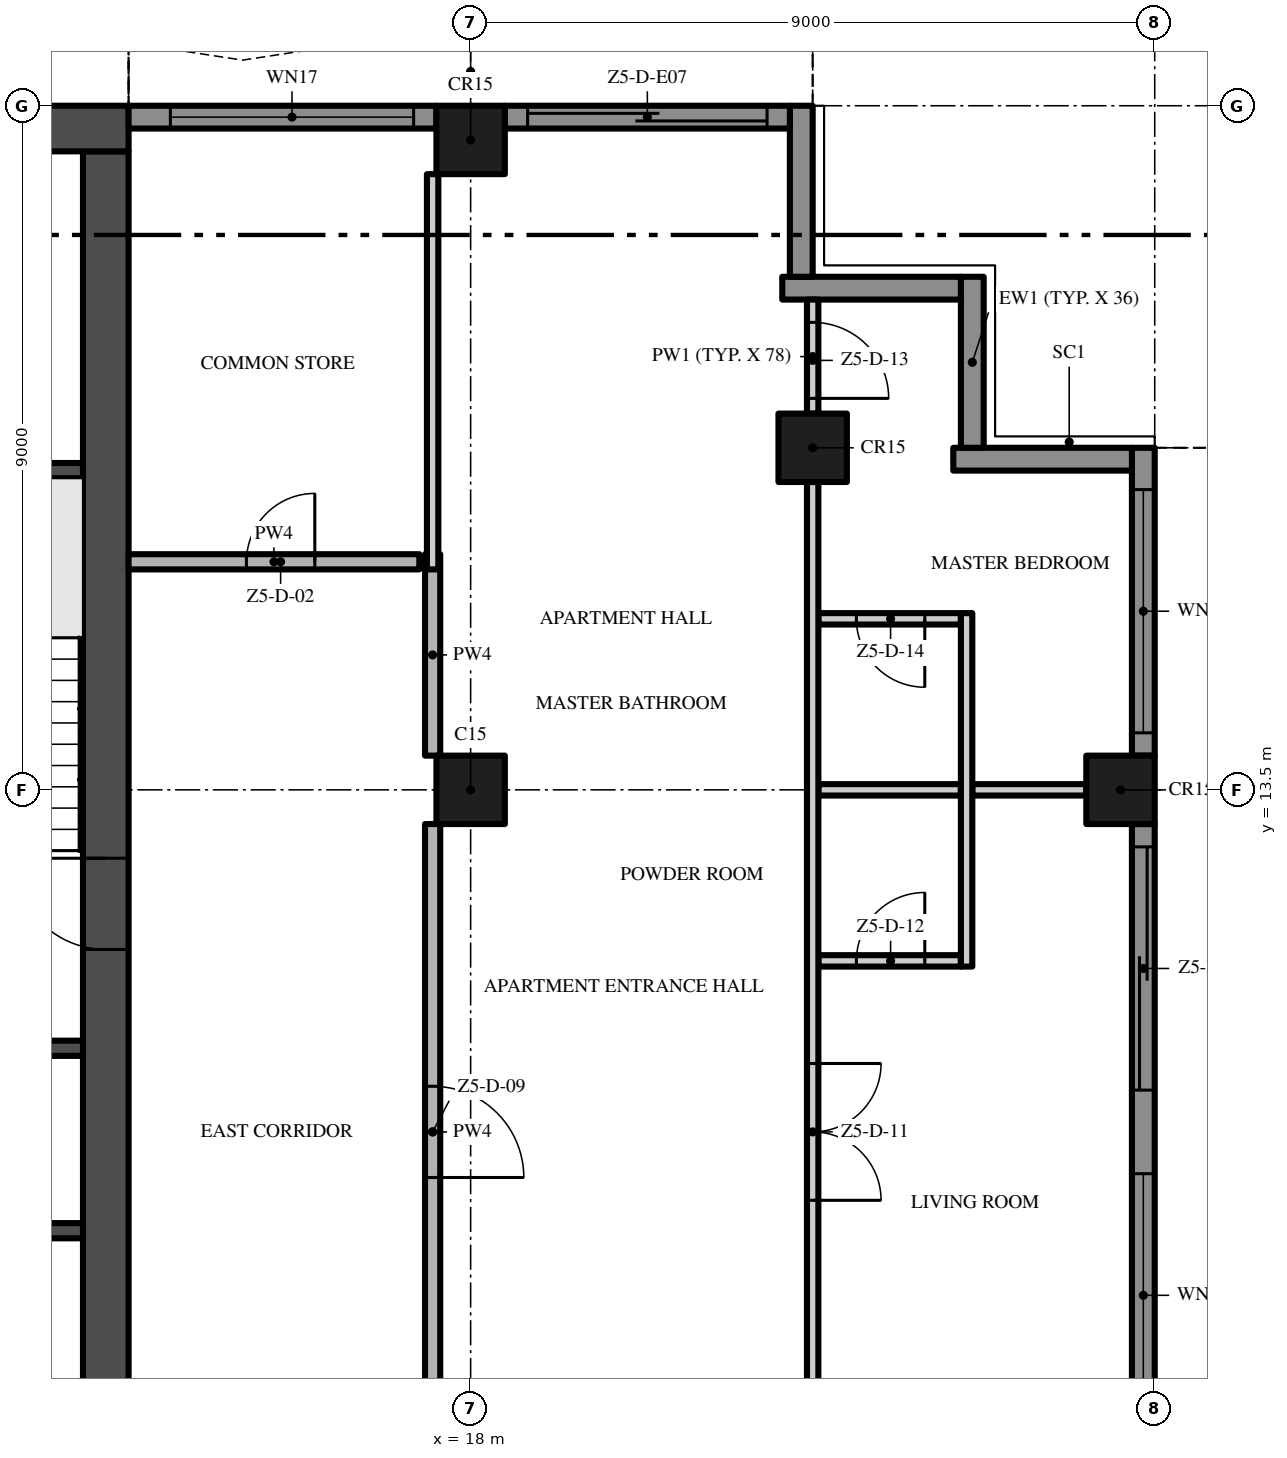
"""IFC4 building model, lengths in metres.
Left out: names, types, materials, properties, quantities, classifications, styles, units other than length and angle.
Written with IfcOpenShell. Run it as: python <this file> out.ifc"""

import sys

from ifc_helpers import new_model, si_unit, direction, frame, frame_2d, origin, origin_2d, place, context, subcontext, project, spatial, polyline, rectangle, outline, extrude, element, fill, save


model = new_model("IFC4")
c1 = context("Model", 3, precision=1e-05, world=origin(), true_north=direction((0.0, 1.0)))
c2 = subcontext(c1, "Body", "Model", "MODEL_VIEW")
j1 = project(units=[si_unit("LENGTHUNIT", "METRE"), si_unit("PLANEANGLEUNIT", "RADIAN")], contexts=[c1])
p1 = place(None, origin())
s1 = spatial("IfcSite", under=j1, at=p1, CompositionType="ELEMENT")
p2 = place(p1, origin())
s2 = spatial("IfcBuilding", under=s1, at=p2, CompositionType="ELEMENT")
p3 = place(p2, frame((0.0, 0.0, 280.6)))
s3 = spatial("IfcBuildingStorey", under=s2, at=p3, CompositionType="ELEMENT", Elevation=280.6)
p4 = place(p3, frame((13.2, 5.1, -0.3), z_axis=(0.0, 0.0, 1.0), x_axis=(0.0, 1.0, 0.0)))
e1 = element("IfcWall", 1, at=p4, inside=s3, PredefinedType="SHEAR", context=c2, shape_type="SweptSolid", body=[
    extrude(rectangle(XDim=16.8, YDim=0.6, at=frame_2d((8.4, 0.0))), origin(), (0.0, 0.0, 1.0), 3.8),
])
p5 = place(p4, frame((6.3, 0.0, 0.3)))
e2 = element("IfcOpeningElement", 2, at=p5, cuts=e1, PredefinedType="OPENING", context=c2, shape_type="SweptSolid", body=[
    extrude(rectangle(XDim=1.2, YDim=2.2, at=frame_2d((0.6, 1.1))), frame((0.0, 0.31, 0.0), z_axis=(0.0, -1.0, 0.0), x_axis=(1.0, 0.0, 0.0)), (0.0, 0.0, 1.0), 0.62),
])
p6 = place(p3, frame((13.5, 22.2, -0.3), z_axis=(0.0, 0.0, 1.0), x_axis=(-1.0, 0.0, 0.0)))
e3 = element("IfcWall", 3, at=p6, inside=s3, PredefinedType="SHEAR", context=c2, shape_type="SweptSolid", body=[
    extrude(rectangle(XDim=27.0, YDim=0.6, at=frame_2d((13.5, 0.0))), origin(), (0.0, 0.0, 1.0), 3.8),
])
for number, where, z_axis, x_axis in (
    (4, (18.0, 13.5, 0.0), (0.0, 0.0, 1.0), (1.0, 0.0, 0.0)),
    (5, (18.0, 22.05, 0.0), (0.0, 0.0, 1.0), (1.0, 0.0, 0.0)),
    (6, (26.55, 13.5, 0.0), (0.0, 0.0, 1.0), (1.0, 0.0, 0.0)),
    (7, (22.5, 18.0, 0.0), (0.0, 0.0, 1.0), (1.0, 0.0, 0.0)),
):
    element("IfcColumn", number, at=place(p3, frame(where, z_axis=z_axis, x_axis=x_axis)), inside=s3, PredefinedType="COLUMN", context=c2, shape_type="SweptSolid", body=[
        extrude(rectangle(XDim=0.9, YDim=0.9, at=origin_2d()), origin(), (0.0, 0.0, 1.0), 3.5),
    ])
p7 = place(p3, frame((26.85, 13.05, 0.0), z_axis=(0.0, 0.0, 1.0), x_axis=(0.0, -1.0, 0.0)))
e8 = element("IfcWall", 8, at=p7, inside=s3, PredefinedType="SOLIDWALL", context=c2, shape_type="SweptSolid", body=[
    extrude(rectangle(XDim=8.1, YDim=0.3, at=frame_2d((4.05, 0.0))), origin(), (0.0, 0.0, 1.0), 3.5),
])
p8 = place(p7, frame((4.6, 0.0, 0.45)))
e9 = element("IfcOpeningElement", 9, at=p8, cuts=e8, PredefinedType="OPENING", context=c2, shape_type="SweptSolid", body=[
    extrude(rectangle(XDim=3.2, YDim=2.65, at=frame_2d((1.6, 1.325))), frame((0.0, 0.16, 0.0), z_axis=(0.0, -1.0, 0.0), x_axis=(1.0, 0.0, 0.0)), (0.0, 0.0, 1.0), 0.32),
])
p9 = place(p7, frame((0.3, 0.0, 0.0)))
e10 = element("IfcOpeningElement", 10, at=p9, cuts=e8, PredefinedType="OPENING", context=c2, shape_type="SweptSolid", body=[
    extrude(rectangle(XDim=3.2, YDim=2.4, at=frame_2d((1.6, 1.2))), frame((0.0, 0.16, 0.0), z_axis=(0.0, -1.0, 0.0), x_axis=(1.0, 0.0, 0.0)), (0.0, 0.0, 1.0), 0.32),
])
p10 = place(p3, frame((26.85, 18.0, 0.0), z_axis=(0.0, 0.0, 1.0), x_axis=(0.0, -1.0, 0.0)))
e11 = element("IfcWall", 11, at=p10, inside=s3, PredefinedType="SOLIDWALL", context=c2, shape_type="SweptSolid", body=[
    extrude(rectangle(XDim=4.05, YDim=0.3, at=frame_2d((2.025, 0.0))), origin(), (0.0, 0.0, 1.0), 3.5),
])
p11 = place(p10, frame((0.55, 0.0, 0.45)))
e12 = element("IfcOpeningElement", 12, at=p11, cuts=e11, PredefinedType="OPENING", context=c2, shape_type="SweptSolid", body=[
    extrude(rectangle(XDim=3.2, YDim=2.65, at=frame_2d((1.6, 1.325))), frame((0.0, 0.16, 0.0), z_axis=(0.0, -1.0, 0.0), x_axis=(1.0, 0.0, 0.0)), (0.0, 0.0, 1.0), 0.32),
])
p12 = place(p3, frame((24.35, 17.85, 0.0), z_axis=(0.0, 0.0, 1.0), x_axis=(1.0, 0.0, 0.0)))
e13 = element("IfcWall", 13, at=p12, inside=s3, PredefinedType="SOLIDWALL", context=c2, shape_type="SweptSolid", body=[
    extrude(rectangle(XDim=2.35, YDim=0.3, at=frame_2d((1.175, 0.0))), origin(), (0.0, 0.0, 1.0), 3.5),
])
p13 = place(p3, frame((24.6, 20.25, 0.0), z_axis=(0.0, 0.0, 1.0), x_axis=(0.0, -1.0, 0.0)))
e14 = element("IfcWall", 14, at=p13, inside=s3, PredefinedType="SOLIDWALL", context=c2, shape_type="SweptSolid", body=[
    extrude(rectangle(XDim=2.25, YDim=0.3, at=frame_2d((1.125, 0.0))), origin(), (0.0, 0.0, 1.0), 3.5),
])
p14 = place(p3, frame((22.1, 20.1, 0.0), z_axis=(0.0, 0.0, 1.0), x_axis=(1.0, 0.0, 0.0)))
e15 = element("IfcWall", 15, at=p14, inside=s3, PredefinedType="SOLIDWALL", context=c2, shape_type="SweptSolid", body=[
    extrude(rectangle(XDim=2.35, YDim=0.3, at=frame_2d((1.175, 0.0))), origin(), (0.0, 0.0, 1.0), 3.5),
])
p15 = place(p3, frame((22.35, 22.5, 0.0), z_axis=(0.0, 0.0, 1.0), x_axis=(0.0, -1.0, 0.0)))
e16 = element("IfcWall", 16, at=p15, inside=s3, PredefinedType="SOLIDWALL", context=c2, shape_type="SweptSolid", body=[
    extrude(rectangle(XDim=2.25, YDim=0.3, at=frame_2d((1.125, 0.0))), origin(), (0.0, 0.0, 1.0), 3.5),
])
p16 = place(p3, frame((18.45, 22.35, 0.0), z_axis=(0.0, 0.0, 1.0), x_axis=(1.0, 0.0, 0.0)))
e17 = element("IfcWall", 17, at=p16, inside=s3, PredefinedType="SOLIDWALL", context=c2, shape_type="SweptSolid", body=[
    extrude(rectangle(XDim=3.75, YDim=0.3, at=frame_2d((1.875, 0.0))), origin(), (0.0, 0.0, 1.0), 3.5),
])
p17 = place(p16, frame((0.3, 0.0, 0.0)))
e18 = element("IfcOpeningElement", 18, at=p17, cuts=e17, PredefinedType="OPENING", context=c2, shape_type="SweptSolid", body=[
    extrude(rectangle(XDim=3.15, YDim=2.4, at=frame_2d((1.575, 1.2))), frame((0.0, 0.16, 0.0), z_axis=(0.0, -1.0, 0.0), x_axis=(1.0, 0.0, 0.0)), (0.0, 0.0, 1.0), 0.32),
])
p18 = place(p3, frame((13.5, 22.35, 0.0), z_axis=(0.0, 0.0, 1.0), x_axis=(1.0, 0.0, 0.0)))
e19 = element("IfcWall", 19, at=p18, inside=s3, PredefinedType="SOLIDWALL", context=c2, shape_type="SweptSolid", body=[
    extrude(rectangle(XDim=4.05, YDim=0.3, at=frame_2d((2.025, 0.0))), origin(), (0.0, 0.0, 1.0), 3.5),
])
p19 = place(p18, frame((0.55, 0.0, 0.45)))
e20 = element("IfcOpeningElement", 20, at=p19, cuts=e19, PredefinedType="OPENING", context=c2, shape_type="SweptSolid", body=[
    extrude(rectangle(XDim=3.2, YDim=2.65, at=frame_2d((1.6, 1.325))), frame((0.0, 0.16, 0.0), z_axis=(0.0, -1.0, 0.0), x_axis=(1.0, 0.0, 0.0)), (0.0, 0.0, 1.0), 0.32),
])
p20 = place(p3, origin())
e21 = element("IfcWall", 21, at=p20, inside=s3, PredefinedType="USERDEFINED", context=c2, shape_type="SweptSolid", body=[
    extrude(outline(polyline([(30.0, -18.0), (29.771, -16.5), (29.171, -15.0), (28.429, -13.5), (27.829, -12.0), (27.6, -10.5), (27.829, -9.0), (28.429, -7.5), (29.171, -6.0), (29.771, -4.5), (30.0, -3.0), (29.771, -1.5), (29.171, 0.0), (28.429, 1.5), (27.829, 3.0), (27.6, 4.5), (27.829, 6.0), (28.429, 7.5), (29.171, 9.0), (29.771, 10.5), (30.0, 12.0), (29.771, 13.5), (29.171, 15.0), (28.429, 16.5), (27.829, 18.0), (27.597, 17.907), (28.201, 16.398), (28.942, 14.898), (29.528, 13.434), (29.747, 12.0), (29.528, 10.566), (28.942, 9.102), (28.201, 7.602), (27.586, 6.066), (27.347, 4.5), (27.586, 2.934), (28.201, 1.398), (28.942, -0.102), (29.528, -1.566), (29.747, -3.0), (29.528, -4.434), (28.942, -5.898), (28.201, -7.398), (27.586, -8.934), (27.347, -10.5), (27.586, -12.066), (28.201, -13.602), (28.942, -15.102), (29.528, -16.566), (29.753, -18.038), (30.0, -18.0)])), origin(), (0.0, 0.0, 1.0), 0.9),
])
p21 = place(p3, origin())
e22 = element("IfcWall", 22, at=p21, inside=s3, PredefinedType="USERDEFINED", context=c2, shape_type="SweptSolid", body=[
    extrude(outline(polyline([(22.5, 25.5), (21.0, 25.271), (19.5, 24.671), (18.0, 23.929), (16.5, 23.329), (15.0, 23.1), (13.5, 23.329), (13.462, 23.082), (15.0, 22.847), (16.566, 23.086), (18.102, 23.701), (19.602, 24.442), (21.066, 25.028), (22.538, 25.253), (22.5, 25.5)])), origin(), (0.0, 0.0, 1.0), 0.9),
])
for number, where, z_axis, x_axis in (
    (23, (9.65, 7.7, 0.0), (0.0, 0.0, 1.0), (1.0, 0.0, 0.0)),
    (24, (9.65, 10.1, 0.0), (0.0, 0.0, 1.0), (1.0, 0.0, 0.0)),
    (25, (9.65, 17.7, 0.0), (0.0, 0.0, 1.0), (1.0, 0.0, 0.0)),
):
    element("IfcWall", number, at=place(p3, frame(where, z_axis=z_axis, x_axis=x_axis)), inside=s3, PredefinedType="SHEAR", context=c2, shape_type="SweptSolid", body=[
        extrude(rectangle(XDim=3.25, YDim=0.2, at=frame_2d((1.625, 0.0))), origin(), (0.0, 0.0, 1.0), 3.5),
    ])
p22 = place(p3, frame((22.575, 11.25, 0.0), z_axis=(0.0, 0.0, 1.0), x_axis=(1.0, 0.0, 0.0)))
e26 = element("IfcWall", 26, at=p22, inside=s3, PredefinedType="PARTITIONING", context=c2, shape_type="SweptSolid", body=[
    extrude(rectangle(XDim=1.875, YDim=0.15, at=frame_2d((0.938, 0.0))), origin(), (0.0, 0.0, 1.0), 3.5),
])
p23 = place(p22, frame((0.5, 0.0, 0.0)))
e27 = element("IfcOpeningElement", 27, at=p23, cuts=e26, PredefinedType="OPENING", context=c2, shape_type="SweptSolid", body=[
    extrude(rectangle(XDim=0.9, YDim=2.1, at=frame_2d((0.45, 1.05))), frame((0.0, 0.085, 0.0), z_axis=(0.0, -1.0, 0.0), x_axis=(1.0, 0.0, 0.0)), (0.0, 0.0, 1.0), 0.17),
])
p24 = place(p3, frame((22.575, 13.5, 0.0), z_axis=(0.0, 0.0, 1.0), x_axis=(1.0, 0.0, 0.0)))
e28 = element("IfcWall", 28, at=p24, inside=s3, PredefinedType="PARTITIONING", context=c2, shape_type="SweptSolid", body=[
    extrude(rectangle(XDim=1.875, YDim=0.15, at=frame_2d((0.938, 0.0))), origin(), (0.0, 0.0, 1.0), 3.5),
])
p25 = place(p3, frame((24.6, 13.5, 0.0), z_axis=(0.0, 0.0, 1.0), x_axis=(1.0, 0.0, 0.0)))
e29 = element("IfcWall", 29, at=p25, inside=s3, PredefinedType="PARTITIONING", context=c2, shape_type="SweptSolid", body=[
    extrude(rectangle(XDim=1.5, YDim=0.15, at=frame_2d((0.75, 0.0))), origin(), (0.0, 0.0, 1.0), 3.5),
])
p26 = place(p3, frame((24.45, 15.75, 0.0), z_axis=(0.0, 0.0, 1.0), x_axis=(-1.0, 0.0, 0.0)))
e30 = element("IfcWall", 30, at=p26, inside=s3, PredefinedType="PARTITIONING", context=c2, shape_type="SweptSolid", body=[
    extrude(rectangle(XDim=1.875, YDim=0.15, at=frame_2d((0.938, 0.0))), origin(), (0.0, 0.0, 1.0), 3.5),
])
p27 = place(p26, frame((0.475, 0.0, 0.0)))
e31 = element("IfcOpeningElement", 31, at=p27, cuts=e30, PredefinedType="OPENING", context=c2, shape_type="SweptSolid", body=[
    extrude(rectangle(XDim=0.9, YDim=2.1, at=frame_2d((0.45, 1.05))), frame((0.0, 0.085, 0.0), z_axis=(0.0, -1.0, 0.0), x_axis=(1.0, 0.0, 0.0)), (0.0, 0.0, 1.0), 0.17),
])
p28 = place(p3, frame((13.5, 16.5, 0.0), z_axis=(0.0, 0.0, 1.0), x_axis=(1.0, 0.0, 0.0)))
e32 = element("IfcWall", 32, at=p28, inside=s3, PredefinedType="PARTITIONING", context=c2, shape_type="SweptSolid", body=[
    extrude(rectangle(XDim=3.825, YDim=0.2, at=frame_2d((1.913, 0.0))), origin(), (0.0, 0.0, 1.0), 3.5),
])
p29 = place(p28, frame((1.55, 0.0, 0.0)))
e33 = element("IfcOpeningElement", 33, at=p29, cuts=e32, PredefinedType="OPENING", context=c2, shape_type="SweptSolid", body=[
    extrude(rectangle(XDim=0.9, YDim=2.1, at=frame_2d((0.45, 1.05))), frame((0.0, 0.11, 0.0), z_axis=(0.0, -1.0, 0.0), x_axis=(1.0, 0.0, 0.0)), (0.0, 0.0, 1.0), 0.22),
])
p30 = place(p3, frame((17.5, 13.05, 0.0), z_axis=(0.0, 0.0, 1.0), x_axis=(0.0, -1.0, 0.0)))
e34 = element("IfcWall", 34, at=p30, inside=s3, PredefinedType="PARTITIONING", context=c2, shape_type="SweptSolid", body=[
    extrude(rectangle(XDim=8.1, YDim=0.2, at=frame_2d((4.05, 0.0))), origin(), (0.0, 0.0, 1.0), 3.5),
])
p31 = place(p30, frame((3.45, 0.0, 0.0)))
e35 = element("IfcOpeningElement", 35, at=p31, cuts=e34, PredefinedType="OPENING", context=c2, shape_type="SweptSolid", body=[
    extrude(rectangle(XDim=1.2, YDim=2.4, at=frame_2d((0.6, 1.2))), frame((0.0, 0.11, 0.0), z_axis=(0.0, -1.0, 0.0), x_axis=(1.0, 0.0, 0.0)), (0.0, 0.0, 1.0), 0.22),
])
p32 = place(p3, frame((17.5, 13.95, 0.0), z_axis=(0.0, 0.0, 1.0), x_axis=(0.0, 1.0, 0.0)))
e36 = element("IfcWall", 36, at=p32, inside=s3, PredefinedType="PARTITIONING", context=c2, shape_type="SweptSolid", body=[
    extrude(rectangle(XDim=2.65, YDim=0.2, at=frame_2d((1.325, 0.0))), origin(), (0.0, 0.0, 1.0), 3.5),
])
p33 = place(p3, frame((17.5, 16.4, 0.0), z_axis=(0.0, 0.0, 1.0), x_axis=(0.0, 1.0, 0.0)))
e37 = element("IfcWall", 37, at=p33, inside=s3, PredefinedType="PARTITIONING", context=c2, shape_type="SweptSolid", body=[
    extrude(rectangle(XDim=5.2, YDim=0.15, at=frame_2d((2.6, 0.0))), origin(), (0.0, 0.0, 1.0), 3.5),
])
p34 = place(p3, frame((22.5, 17.55, 0.0), z_axis=(0.0, 0.0, 1.0), x_axis=(0.0, -1.0, 0.0)))
e38 = element("IfcWall", 38, at=p34, inside=s3, PredefinedType="PARTITIONING", context=c2, shape_type="SweptSolid", body=[
    extrude(rectangle(XDim=17.45, YDim=0.15, at=frame_2d((8.725, 0.0))), origin(), (0.0, 0.0, 1.0), 3.5),
])
p35 = place(p34, frame((14.8, 0.0, 0.0)))
e39 = element("IfcOpeningElement", 39, at=p35, cuts=e38, PredefinedType="OPENING", context=c2, shape_type="SweptSolid", body=[
    extrude(rectangle(XDim=1.0, YDim=2.4, at=frame_2d((0.5, 1.2))), frame((0.0, 0.085, 0.0), z_axis=(0.0, -1.0, 0.0), x_axis=(1.0, 0.0, 0.0)), (0.0, 0.0, 1.0), 0.17),
])
p36 = place(p34, frame((7.65, 0.0, 0.0)))
e40 = element("IfcOpeningElement", 40, at=p36, cuts=e38, PredefinedType="OPENING", context=c2, shape_type="SweptSolid", body=[
    extrude(rectangle(XDim=1.8, YDim=2.4, at=frame_2d((0.9, 1.2))), frame((0.0, 0.085, 0.0), z_axis=(0.0, -1.0, 0.0), x_axis=(1.0, 0.0, 0.0)), (0.0, 0.0, 1.0), 0.17),
])
p37 = place(p3, frame((22.5, 19.95, 0.0), z_axis=(0.0, 0.0, 1.0), x_axis=(0.0, -1.0, 0.0)))
e41 = element("IfcWall", 41, at=p37, inside=s3, PredefinedType="PARTITIONING", context=c2, shape_type="SweptSolid", body=[
    extrude(rectangle(XDim=1.5, YDim=0.15, at=frame_2d((0.75, 0.0))), origin(), (0.0, 0.0, 1.0), 3.5),
])
p38 = place(p37, frame((0.3, 0.0, 0.0)))
e42 = element("IfcOpeningElement", 42, at=p38, cuts=e41, PredefinedType="OPENING", context=c2, shape_type="SweptSolid", body=[
    extrude(rectangle(XDim=1.0, YDim=2.4, at=frame_2d((0.5, 1.2))), frame((0.0, 0.085, 0.0), z_axis=(0.0, -1.0, 0.0), x_axis=(1.0, 0.0, 0.0)), (0.0, 0.0, 1.0), 0.17),
])
p39 = place(p3, frame((24.525, 11.175, 0.0), z_axis=(0.0, 0.0, 1.0), x_axis=(0.0, 1.0, 0.0)))
e43 = element("IfcWall", 43, at=p39, inside=s3, PredefinedType="PARTITIONING", context=c2, shape_type="SweptSolid", body=[
    extrude(rectangle(XDim=4.65, YDim=0.15, at=frame_2d((2.325, 0.0))), origin(), (0.0, 0.0, 1.0), 3.5),
])
p40 = place(p8, origin())
e44 = element("IfcWindow", 44, at=p40, inside=s3, PartitioningType="SINGLE_PANEL", PredefinedType="WINDOW", context=c2, shape_type="SweptSolid", body=[
    extrude(rectangle(XDim=3.2, YDim=2.65, at=frame_2d((1.6, 1.325))), frame((0.0, 0.03, 0.0), z_axis=(0.0, -1.0, 0.0), x_axis=(1.0, 0.0, 0.0)), (0.0, 0.0, 1.0), 0.06),
])
fill(e9, e44)
p41 = place(p9, origin())
e45 = element("IfcDoor", 45, at=p41, inside=s3, OperationType="SINGLE_SWING_LEFT", PredefinedType="DOOR", context=c2, shape_type="SweptSolid", body=[
    extrude(rectangle(XDim=3.2, YDim=2.4, at=frame_2d((1.6, 1.2))), frame((0.0, 0.025, 0.0), z_axis=(0.0, -1.0, 0.0), x_axis=(1.0, 0.0, 0.0)), (0.0, 0.0, 1.0), 0.05),
])
fill(e10, e45)
p42 = place(p11, origin())
e46 = element("IfcWindow", 46, at=p42, inside=s3, PartitioningType="SINGLE_PANEL", PredefinedType="WINDOW", context=c2, shape_type="SweptSolid", body=[
    extrude(rectangle(XDim=3.2, YDim=2.65, at=frame_2d((1.6, 1.325))), frame((0.0, 0.03, 0.0), z_axis=(0.0, -1.0, 0.0), x_axis=(1.0, 0.0, 0.0)), (0.0, 0.0, 1.0), 0.06),
])
fill(e12, e46)
p43 = place(p17, origin())
e47 = element("IfcDoor", 47, at=p43, inside=s3, OperationType="SINGLE_SWING_LEFT", PredefinedType="DOOR", context=c2, shape_type="SweptSolid", body=[
    extrude(rectangle(XDim=3.15, YDim=2.4, at=frame_2d((1.575, 1.2))), frame((0.0, 0.025, 0.0), z_axis=(0.0, -1.0, 0.0), x_axis=(1.0, 0.0, 0.0)), (0.0, 0.0, 1.0), 0.05),
])
fill(e18, e47)
p44 = place(p19, origin())
e48 = element("IfcWindow", 48, at=p44, inside=s3, PartitioningType="SINGLE_PANEL", PredefinedType="WINDOW", context=c2, shape_type="SweptSolid", body=[
    extrude(rectangle(XDim=3.2, YDim=2.65, at=frame_2d((1.6, 1.325))), frame((0.0, 0.03, 0.0), z_axis=(0.0, -1.0, 0.0), x_axis=(1.0, 0.0, 0.0)), (0.0, 0.0, 1.0), 0.06),
])
fill(e20, e48)
p45 = place(p5, frame((1.2, 0.0, 0.0), z_axis=(0.0, 0.0, 1.0), x_axis=(-1.0, 0.0, 0.0)))
e49 = element("IfcDoor", 49, at=p45, inside=s3, OperationType="SINGLE_SWING_LEFT", PredefinedType="DOOR", context=c2, shape_type="SweptSolid", body=[
    extrude(rectangle(XDim=1.2, YDim=2.2, at=frame_2d((0.6, 1.1))), frame((0.0, 0.025, 0.0), z_axis=(0.0, -1.0, 0.0), x_axis=(1.0, 0.0, 0.0)), (0.0, 0.0, 1.0), 0.05),
])
fill(e2, e49)
p46 = place(p29, origin())
e50 = element("IfcDoor", 50, at=p46, inside=s3, OperationType="SINGLE_SWING_RIGHT", PredefinedType="DOOR", context=c2, shape_type="SweptSolid", body=[
    extrude(rectangle(XDim=0.9, YDim=2.1, at=frame_2d((0.45, 1.05))), frame((0.0, 0.025, 0.0), z_axis=(0.0, -1.0, 0.0), x_axis=(1.0, 0.0, 0.0)), (0.0, 0.0, 1.0), 0.05),
])
fill(e33, e50)
p47 = place(p31, origin())
e51 = element("IfcDoor", 51, at=p47, inside=s3, OperationType="SINGLE_SWING_RIGHT", PredefinedType="DOOR", context=c2, shape_type="SweptSolid", body=[
    extrude(rectangle(XDim=1.2, YDim=2.4, at=frame_2d((0.6, 1.2))), frame((0.0, 0.025, 0.0), z_axis=(0.0, -1.0, 0.0), x_axis=(1.0, 0.0, 0.0)), (0.0, 0.0, 1.0), 0.05),
])
fill(e35, e51)
p48 = place(p36, origin())
e52 = element("IfcDoor", 52, at=p48, inside=s3, OperationType="DOUBLE_DOOR_SINGLE_SWING", PredefinedType="DOOR", context=c2, shape_type="SweptSolid", body=[
    extrude(rectangle(XDim=1.8, YDim=2.4, at=frame_2d((0.9, 1.2))), frame((0.0, 0.025, 0.0), z_axis=(0.0, -1.0, 0.0), x_axis=(1.0, 0.0, 0.0)), (0.0, 0.0, 1.0), 0.05),
])
fill(e40, e52)
p49 = place(p23, origin())
e53 = element("IfcDoor", 53, at=p49, inside=s3, OperationType="SINGLE_SWING_RIGHT", PredefinedType="DOOR", context=c2, shape_type="SweptSolid", body=[
    extrude(rectangle(XDim=0.9, YDim=2.1, at=frame_2d((0.45, 1.05))), frame((0.0, 0.025, 0.0), z_axis=(0.0, -1.0, 0.0), x_axis=(1.0, 0.0, 0.0)), (0.0, 0.0, 1.0), 0.05),
])
fill(e27, e53)
p50 = place(p38, origin())
e54 = element("IfcDoor", 54, at=p50, inside=s3, OperationType="SINGLE_SWING_RIGHT", PredefinedType="DOOR", context=c2, shape_type="SweptSolid", body=[
    extrude(rectangle(XDim=1.0, YDim=2.4, at=frame_2d((0.5, 1.2))), frame((0.0, 0.025, 0.0), z_axis=(0.0, -1.0, 0.0), x_axis=(1.0, 0.0, 0.0)), (0.0, 0.0, 1.0), 0.05),
])
fill(e42, e54)
p51 = place(p27, origin())
e55 = element("IfcDoor", 55, at=p51, inside=s3, OperationType="SINGLE_SWING_LEFT", PredefinedType="DOOR", context=c2, shape_type="SweptSolid", body=[
    extrude(rectangle(XDim=0.9, YDim=2.1, at=frame_2d((0.45, 1.05))), frame((0.0, 0.025, 0.0), z_axis=(0.0, -1.0, 0.0), x_axis=(1.0, 0.0, 0.0)), (0.0, 0.0, 1.0), 0.05),
])
fill(e31, e55)
save(model, sys.argv[1])
